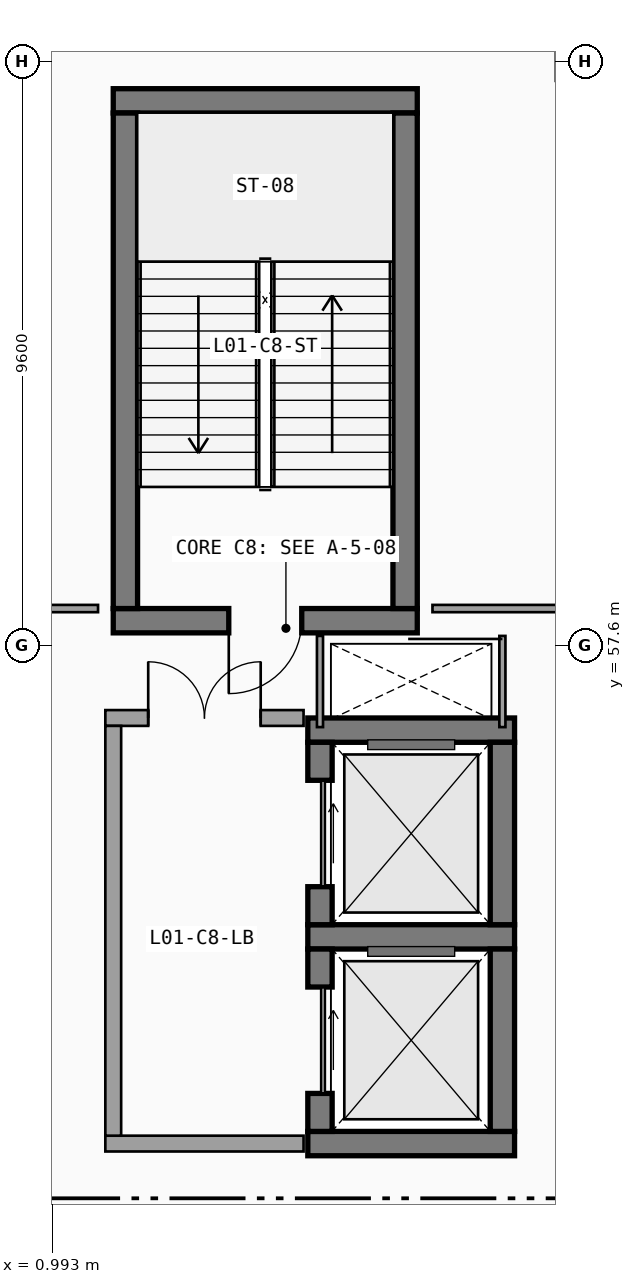
"""IFC4 building model, lengths in metres.
Left out: names, types, materials, properties, quantities, classifications, styles, units other than length and angle.
Written with IfcOpenShell. Run it as: python <this file> out.ifc"""

import sys

from ifc_helpers import new_model, si_unit, direction, frame, frame_2d, origin, place, context, subcontext, project, spatial, rectangle, extrude, element, fill, save


model = new_model("IFC4")
c1 = context("Model", 3, precision=1e-05, world=origin(), true_north=direction((0.0, 1.0)))
c2 = subcontext(c1, "Body", "Model", "MODEL_VIEW")
j1 = project(units=[si_unit("LENGTHUNIT", "METRE"), si_unit("PLANEANGLEUNIT", "RADIAN")], contexts=[c1])
p1 = place(None, origin())
s1 = spatial("IfcSite", under=j1, at=p1, CompositionType="ELEMENT")
p2 = place(p1, origin())
s2 = spatial("IfcBuilding", under=s1, at=p2, CompositionType="ELEMENT")
p3 = place(p2, frame((0.0, 0.0, 4.8)))
s3 = spatial("IfcBuildingStorey", under=s2, at=p3, CompositionType="ELEMENT", Elevation=4.8)
p4 = place(p3, frame((2.0, 58.0, 0.0), z_axis=(0.0, 0.0, 1.0), x_axis=(1.0, 0.0, 0.0)))
e1 = element("IfcWall", 1, at=p4, inside=s3, PredefinedType="SHEAR", context=c2, shape_type="SweptSolid", body=[
    extrude(rectangle(XDim=5.0, YDim=0.4, at=frame_2d((2.5, 0.0))), origin(), (0.0, 0.0, 1.0), 4.52),
])
p5 = place(p4, frame((3.1, 0.0, 0.0), z_axis=(0.0, 0.0, 1.0), x_axis=(-1.0, 0.0, 0.0)))
e2 = element("IfcOpeningElement", 2, at=p5, cuts=e1, PredefinedType="OPENING", context=c2, shape_type="SweptSolid", body=[
    extrude(rectangle(XDim=1.2, YDim=2.2, at=frame_2d((0.6, 1.1))), frame((0.0, 0.21, 0.0), z_axis=(0.0, -1.0, 0.0), x_axis=(1.0, 0.0, 0.0)), (0.0, 0.0, 1.0), 0.42),
])
p6 = place(p3, frame((7.0, 66.55, 0.0), z_axis=(0.0, 0.0, 1.0), x_axis=(-1.0, 0.0, 0.0)))
e3 = element("IfcWall", 3, at=p6, inside=s3, PredefinedType="SHEAR", context=c2, shape_type="SweptSolid", body=[
    extrude(rectangle(XDim=5.0, YDim=0.4, at=frame_2d((2.5, 0.0))), origin(), (0.0, 0.0, 1.0), 4.52),
])
for number, where, z_axis, x_axis in (
    (4, (2.2, 66.35, 0.0), (0.0, 0.0, 1.0), (0.0, -1.0, 0.0)),
    (5, (6.8, 58.2, 0.0), (0.0, 0.0, 1.0), (0.0, 1.0, 0.0)),
):
    element("IfcWall", number, at=place(p3, frame(where, z_axis=z_axis, x_axis=x_axis)), inside=s3, PredefinedType="SHEAR", context=c2, shape_type="SweptSolid", body=[
        extrude(rectangle(XDim=8.15, YDim=0.4, at=frame_2d((4.075, 0.0))), origin(), (0.0, 0.0, 1.0), 4.52),
    ])
for number, where, z_axis, x_axis in (
    (6, (5.2, 49.4, 0.0), (0.0, 0.0, 1.0), (1.0, 0.0, 0.0)),
    (7, (8.6, 52.8, 0.0), (0.0, 0.0, 1.0), (-1.0, 0.0, 0.0)),
):
    element("IfcWall", number, at=place(p3, frame(where, z_axis=z_axis, x_axis=x_axis)), inside=s3, PredefinedType="SHEAR", context=c2, shape_type="SweptSolid", body=[
        extrude(rectangle(XDim=3.4, YDim=0.4, at=frame_2d((1.7, 0.0))), origin(), (0.0, 0.0, 1.0), 4.52),
    ])
p7 = place(p3, frame((5.4, 52.6, 0.0), z_axis=(0.0, 0.0, 1.0), x_axis=(0.0, -1.0, 0.0)))
e8 = element("IfcWall", 8, at=p7, inside=s3, PredefinedType="SHEAR", context=c2, shape_type="SweptSolid", body=[
    extrude(rectangle(XDim=3.0, YDim=0.4, at=frame_2d((1.5, 0.0))), origin(), (0.0, 0.0, 1.0), 4.52),
])
p8 = place(p7, frame((0.625, 0.0, 0.0), z_axis=(0.0, 0.0, 1.0), x_axis=(1.0, 0.0, 0.0)))
e9 = element("IfcOpeningElement", 9, at=p8, cuts=e8, PredefinedType="OPENING", context=c2, shape_type="SweptSolid", body=[
    extrude(rectangle(XDim=1.75, YDim=2.35, at=frame_2d((0.875, 1.175))), frame((0.0, 0.21, 0.0), z_axis=(0.0, -1.0, 0.0), x_axis=(1.0, 0.0, 0.0)), (0.0, 0.0, 1.0), 0.42),
])
p9 = place(p3, frame((8.4, 49.6, 0.0), z_axis=(0.0, 0.0, 1.0), x_axis=(0.0, 1.0, 0.0)))
e10 = element("IfcWall", 10, at=p9, inside=s3, PredefinedType="SHEAR", context=c2, shape_type="SweptSolid", body=[
    extrude(rectangle(XDim=3.0, YDim=0.4, at=frame_2d((1.5, 0.0))), origin(), (0.0, 0.0, 1.0), 4.52),
])
p10 = place(p3, frame((8.6, 56.2, 0.0), z_axis=(0.0, 0.0, 1.0), x_axis=(-1.0, 0.0, 0.0)))
e11 = element("IfcWall", 11, at=p10, inside=s3, PredefinedType="SHEAR", context=c2, shape_type="SweptSolid", body=[
    extrude(rectangle(XDim=3.4, YDim=0.4, at=frame_2d((1.7, 0.0))), origin(), (0.0, 0.0, 1.0), 4.52),
])
p11 = place(p3, frame((5.4, 56.0, 0.0), z_axis=(0.0, 0.0, 1.0), x_axis=(0.0, -1.0, 0.0)))
e12 = element("IfcWall", 12, at=p11, inside=s3, PredefinedType="SHEAR", context=c2, shape_type="SweptSolid", body=[
    extrude(rectangle(XDim=3.0, YDim=0.4, at=frame_2d((1.5, 0.0))), origin(), (0.0, 0.0, 1.0), 4.52),
])
p12 = place(p11, frame((0.625, 0.0, 0.0), z_axis=(0.0, 0.0, 1.0), x_axis=(1.0, 0.0, 0.0)))
e13 = element("IfcOpeningElement", 13, at=p12, cuts=e12, PredefinedType="OPENING", context=c2, shape_type="SweptSolid", body=[
    extrude(rectangle(XDim=1.75, YDim=2.35, at=frame_2d((0.875, 1.175))), frame((0.0, 0.21, 0.0), z_axis=(0.0, -1.0, 0.0), x_axis=(1.0, 0.0, 0.0)), (0.0, 0.0, 1.0), 0.42),
])
p13 = place(p3, frame((8.4, 53.0, 0.0), z_axis=(0.0, 0.0, 1.0), x_axis=(0.0, 1.0, 0.0)))
e14 = element("IfcWall", 14, at=p13, inside=s3, PredefinedType="SHEAR", context=c2, shape_type="SweptSolid", body=[
    extrude(rectangle(XDim=3.0, YDim=0.4, at=frame_2d((1.5, 0.0))), origin(), (0.0, 0.0, 1.0), 4.52),
])
for number, where, z_axis, x_axis in (
    (15, (5.4, 57.75, 0.0), (0.0, 0.0, 1.0), (0.0, -1.0, 0.0)),
    (16, (8.4, 56.25, 0.0), (0.0, 0.0, 1.0), (0.0, 1.0, 0.0)),
):
    element("IfcWall", number, at=place(p3, frame(where, z_axis=z_axis, x_axis=x_axis)), inside=s3, PredefinedType="PARTITIONING", context=c2, shape_type="SweptSolid", body=[
        extrude(rectangle(XDim=1.5, YDim=0.1, at=frame_2d((0.75, 0.0))), origin(), (0.0, 0.0, 1.0), 4.52),
    ])
p14 = place(p3, frame((1.87, 49.4, 0.0), z_axis=(0.0, 0.0, 1.0), x_axis=(1.0, 0.0, 0.0)))
e17 = element("IfcWall", 17, at=p14, inside=s3, PredefinedType="SOLIDWALL", context=c2, shape_type="SweptSolid", body=[
    extrude(rectangle(XDim=3.26, YDim=0.26, at=frame_2d((1.63, 0.0))), origin(), (0.0, 0.0, 1.0), 4.52),
])
p15 = place(p3, frame((5.13, 56.4, 0.0), z_axis=(0.0, 0.0, 1.0), x_axis=(-1.0, 0.0, 0.0)))
e18 = element("IfcWall", 18, at=p15, inside=s3, PredefinedType="SOLIDWALL", context=c2, shape_type="SweptSolid", body=[
    extrude(rectangle(XDim=3.26, YDim=0.26, at=frame_2d((1.63, 0.0))), origin(), (0.0, 0.0, 1.0), 4.52),
])
p16 = place(p15, frame((2.555, 0.0, 0.0), z_axis=(0.0, 0.0, 1.0), x_axis=(-1.0, 0.0, 0.0)))
e19 = element("IfcOpeningElement", 19, at=p16, cuts=e18, PredefinedType="OPENING", context=c2, shape_type="SweptSolid", body=[
    extrude(rectangle(XDim=1.85, YDim=2.25, at=frame_2d((0.925, 1.125))), frame((0.0, 0.14, 0.0), z_axis=(0.0, -1.0, 0.0), x_axis=(1.0, 0.0, 0.0)), (0.0, 0.0, 1.0), 0.28),
])
p17 = place(p3, frame((2.0, 56.27, 0.0), z_axis=(0.0, 0.0, 1.0), x_axis=(0.0, -1.0, 0.0)))
e20 = element("IfcWall", 20, at=p17, inside=s3, PredefinedType="SOLIDWALL", context=c2, shape_type="SweptSolid", body=[
    extrude(rectangle(XDim=6.74, YDim=0.26, at=frame_2d((3.37, 0.0))), origin(), (0.0, 0.0, 1.0), 4.52),
])
p18 = place(p3, frame((1.75, 58.2, 0.0), z_axis=(0.0, 0.0, 1.0), x_axis=(-1.0, 0.0, 0.0)))
e21 = element("IfcWall", 21, at=p18, inside=s3, PredefinedType="PARTITIONING", context=c2, shape_type="SweptSolid", body=[
    extrude(rectangle(XDim=1.35, YDim=0.12, at=frame_2d((0.675, 0.0))), origin(), (0.0, 0.0, 1.0), 4.52),
])
p19 = place(p3, frame((42.8, 58.2, 0.0), z_axis=(0.0, 0.0, 1.0), x_axis=(-1.0, 0.0, 0.0)))
e22 = element("IfcWall", 22, at=p19, inside=s3, PredefinedType="PARTITIONING", context=c2, shape_type="SweptSolid", body=[
    extrude(rectangle(XDim=35.55, YDim=0.12, at=frame_2d((17.775, 0.0))), origin(), (0.0, 0.0, 1.0), 2.52),
])
p20 = place(p19, frame((15.365, 0.0, 0.0), z_axis=(0.0, 0.0, 1.0), x_axis=(1.0, 0.0, 0.0)))
e23 = element("IfcOpeningElement", 23, at=p20, cuts=e22, PredefinedType="OPENING", context=c2, shape_type="SweptSolid", body=[
    extrude(rectangle(XDim=0.95, YDim=2.15, at=frame_2d((0.475, 1.075))), frame((0.0, 0.07, 0.0), z_axis=(0.0, -1.0, 0.0), x_axis=(1.0, 0.0, 0.0)), (0.0, 0.0, 1.0), 0.14),
])
p21 = place(p5, origin())
e24 = element("IfcDoor", 24, at=p21, inside=s3, OperationType="SINGLE_SWING_RIGHT", PredefinedType="DOOR", context=c2, shape_type="SweptSolid", body=[
    extrude(rectangle(XDim=1.2, YDim=2.2, at=frame_2d((0.6, 1.1))), frame((0.0, 0.025, 0.0), z_axis=(0.0, -1.0, 0.0), x_axis=(1.0, 0.0, 0.0)), (0.0, 0.0, 1.0), 0.05),
])
fill(e2, e24)
p22 = place(p8, origin())
e25 = element("IfcDoor", 25, at=p22, inside=s3, OperationType="SLIDING_TO_LEFT", PredefinedType="DOOR", context=c2, shape_type="SweptSolid", body=[
    extrude(rectangle(XDim=1.75, YDim=2.35, at=frame_2d((0.875, 1.175))), frame((0.0, 0.025, 0.0), z_axis=(0.0, -1.0, 0.0), x_axis=(1.0, 0.0, 0.0)), (0.0, 0.0, 1.0), 0.05),
])
fill(e9, e25)
p23 = place(p12, origin())
e26 = element("IfcDoor", 26, at=p23, inside=s3, OperationType="SLIDING_TO_LEFT", PredefinedType="DOOR", context=c2, shape_type="SweptSolid", body=[
    extrude(rectangle(XDim=1.75, YDim=2.35, at=frame_2d((0.875, 1.175))), frame((0.0, 0.025, 0.0), z_axis=(0.0, -1.0, 0.0), x_axis=(1.0, 0.0, 0.0)), (0.0, 0.0, 1.0), 0.05),
])
fill(e13, e26)
p24 = place(p16, origin())
e27 = element("IfcDoor", 27, at=p24, inside=s3, OperationType="DOUBLE_DOOR_SINGLE_SWING", PredefinedType="DOOR", context=c2, shape_type="SweptSolid", body=[
    extrude(rectangle(XDim=1.85, YDim=2.25, at=frame_2d((0.925, 1.125))), frame((0.0, 0.025, 0.0), z_axis=(0.0, -1.0, 0.0), x_axis=(1.0, 0.0, 0.0)), (0.0, 0.0, 1.0), 0.05),
])
fill(e19, e27)
save(model, sys.argv[1])
